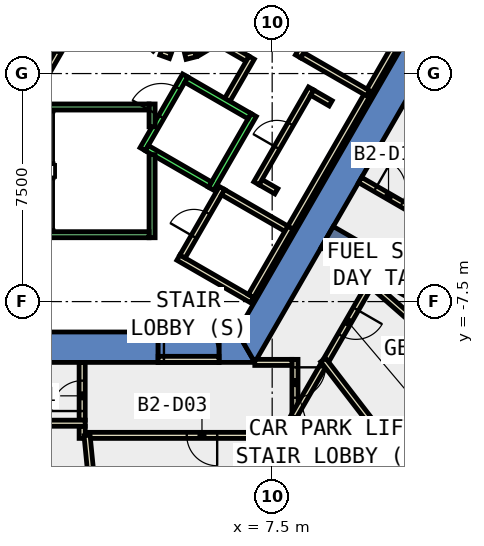
"""IFC4 building model, lengths in metres.
Left out: names, types, materials, properties, quantities, classifications, styles, units other than length and angle.
Written with IfcOpenShell. Run it as: python <this file> out.ifc"""

import sys

from ifc_helpers import new_model, si_unit, direction, frame, frame_2d, origin, place, context, subcontext, project, spatial, polyline, rectangle, outline, extrude, element, fill, save


model = new_model("IFC4")
c1 = context("Model", 3, precision=1e-05, world=origin(), true_north=direction((0.0, 1.0)))
c2 = subcontext(c1, "Body", "Model", "MODEL_VIEW")
j1 = project(units=[si_unit("LENGTHUNIT", "METRE"), si_unit("PLANEANGLEUNIT", "RADIAN")], contexts=[c1])
p1 = place(None, origin())
s1 = spatial("IfcSite", under=j1, at=p1, CompositionType="ELEMENT")
p2 = place(p1, origin())
s2 = spatial("IfcBuilding", under=s1, at=p2, CompositionType="ELEMENT")
p3 = place(p2, frame((0.0, 0.0, -11.0)))
s3 = spatial("IfcBuildingStorey", under=s2, at=p3, CompositionType="ELEMENT", Elevation=-11.0)
p4 = place(p3, frame((0.0, 0.0, -0.42)))
e1 = element("IfcWall", 1, at=p4, inside=s3, PredefinedType="SHEAR", context=c2, shape_type="SweptSolid", body=[
    extrude(outline(polyline([(3.75, -9.5), (3.75, -8.5), (-6.351, -8.5), (-6.928, -9.5), (3.75, -9.5)])), origin(), (0.0, 0.0, 1.0), 5.5),
])
p5 = place(p3, frame((0.0, 0.0, -0.42)))
e2 = element("IfcWall", 2, at=p5, inside=s3, PredefinedType="SHEAR", context=c2, shape_type="SweptSolid", body=[
    extrude(outline(polyline([(5.75, -8.5), (5.75, -9.5), (6.928, -9.5), (6.351, -8.5), (5.75, -8.5)])), origin(), (0.0, 0.0, 1.0), 5.5),
])
p6 = place(p3, frame((0.0, 0.0, 3.6)))
e3 = element("IfcWall", 3, at=p6, inside=s3, PredefinedType="SHEAR", context=c2, shape_type="SweptSolid", body=[
    extrude(outline(polyline([(5.75, -9.5), (5.75, -8.5), (3.75, -8.5), (3.75, -9.5), (5.75, -9.5)])), origin(), (0.0, 0.0, 1.0), 1.48),
])
p7 = place(p3, frame((0.0, 0.0, -0.42)))
e4 = element("IfcWall", 4, at=p7, inside=s3, PredefinedType="SHEAR", context=c2, shape_type="SweptSolid", body=[
    extrude(outline(polyline([(6.928, -9.5), (13.856, 2.5), (12.702, 2.5), (6.351, -8.5), (6.928, -9.5)])), origin(), (0.0, 0.0, 1.0), 5.5),
])
p8 = place(p3, frame((9.31, -5.375, -0.42), z_axis=(0.0, 0.0, 1.0), x_axis=(0.866017533419, -0.500013631625, 0.0)))
e5 = element("IfcWall", 5, at=p8, inside=s3, PredefinedType="SHEAR", context=c2, shape_type="SweptSolid", body=[
    extrude(rectangle(XDim=9.0, YDim=0.8, at=frame_2d((4.5, 0.0))), origin(), (0.0, 0.0, 1.0), 5.5),
])
p9 = place(p3, frame((1.25, -11.4, 0.0), z_axis=(0.0, 0.0, 1.0), x_axis=(0.0, 1.0, 0.0)))
e6 = element("IfcWall", 6, at=p9, inside=s3, PredefinedType="PARTITIONING", context=c2, shape_type="SweptSolid", body=[
    extrude(rectangle(XDim=1.9, YDim=0.2, at=frame_2d((0.95, 0.0))), origin(), (0.0, 0.0, 1.0), 5.05),
])
p10 = place(p9, frame((0.3, 0.0, 0.0)))
e7 = element("IfcOpeningElement", 7, at=p10, cuts=e6, PredefinedType="OPENING", context=c2, shape_type="SweptSolid", body=[
    extrude(rectangle(XDim=1.0, YDim=2.1, at=frame_2d((0.5, 1.05))), frame((0.0, 0.11, 0.0), z_axis=(0.0, -1.0, 0.0), x_axis=(1.0, 0.0, 0.0)), (0.0, 0.0, 1.0), 0.22),
])
p11 = place(p3, frame((8.25, -9.4, 0.0), z_axis=(0.0, 0.0, 1.0), x_axis=(0.0, -1.0, 0.0)))
e8 = element("IfcWall", 8, at=p11, inside=s3, PredefinedType="PARTITIONING", context=c2, shape_type="SweptSolid", body=[
    extrude(rectangle(XDim=1.71, YDim=0.2, at=frame_2d((0.855, 0.0))), origin(), (0.0, 0.0, 1.0), 5.05),
])
p12 = place(p11, frame((0.262, 0.0, 0.0)))
e9 = element("IfcOpeningElement", 9, at=p12, cuts=e8, PredefinedType="OPENING", context=c2, shape_type="SweptSolid", body=[
    extrude(rectangle(XDim=1.0, YDim=2.1, at=frame_2d((0.5, 1.05))), frame((0.0, 0.11, 0.0), z_axis=(0.0, -1.0, 0.0), x_axis=(1.0, 0.0, 0.0)), (0.0, 0.0, 1.0), 0.22),
])
p13 = place(p3, frame((6.928, -9.5, 0.0), z_axis=(0.0, 0.0, 1.0), x_axis=(1.0, 0.0, 0.0)))
e10 = element("IfcWall", 10, at=p13, inside=s3, PredefinedType="PARTITIONING", context=c2, shape_type="SweptSolid", body=[
    extrude(rectangle(XDim=1.222, YDim=0.2, at=frame_2d((0.611, 0.0))), origin(), (0.0, 0.0, 1.0), 5.05),
])
p14 = place(p3, frame((8.25, -11.31, 0.0), z_axis=(0.0, 0.0, 1.0), x_axis=(0.0, -1.0, 0.0)))
e11 = element("IfcWall", 11, at=p14, inside=s3, PredefinedType="PARTITIONING", context=c2, shape_type="SweptSolid", body=[
    extrude(rectangle(XDim=0.49, YDim=0.2, at=frame_2d((0.245, 0.0))), origin(), (0.0, 0.0, 1.0), 5.05),
])
p15 = place(p3, frame((8.35, -11.9, 0.0), z_axis=(0.0, 0.0, 1.0), x_axis=(-1.0, 0.0, 0.0)))
e12 = element("IfcWall", 12, at=p15, inside=s3, PredefinedType="PARTITIONING", context=c2, shape_type="SweptSolid", body=[
    extrude(rectangle(XDim=7.039, YDim=0.2, at=frame_2d((3.52, 0.0))), origin(), (0.0, 0.0, 1.0), 5.05),
])
p16 = place(p15, frame((2.659, 0.0, 0.0)))
e13 = element("IfcOpeningElement", 13, at=p16, cuts=e12, PredefinedType="OPENING", context=c2, shape_type="SweptSolid", body=[
    extrude(rectangle(XDim=1.0, YDim=2.1, at=frame_2d((0.5, 1.05))), frame((0.0, 0.11, 0.0), z_axis=(0.0, -1.0, 0.0), x_axis=(1.0, 0.0, 0.0)), (0.0, 0.0, 1.0), 0.22),
])
p17 = place(p3, frame((1.25, -12.0, 0.0), z_axis=(0.0, 0.0, 1.0), x_axis=(0.0, 1.0, 0.0)))
e14 = element("IfcWall", 14, at=p17, inside=s3, PredefinedType="PARTITIONING", context=c2, shape_type="SweptSolid", body=[
    extrude(rectangle(XDim=0.4, YDim=0.2, at=frame_2d((0.2, 0.0))), origin(), (0.0, 0.0, 1.0), 5.05),
])
p18 = place(p3, frame((1.35, -11.5, 0.0), z_axis=(0.0, 0.0, 1.0), x_axis=(-1.0, 0.0, 0.0)))
e15 = element("IfcWall", 15, at=p18, inside=s3, PredefinedType="PARTITIONING", context=c2, shape_type="SweptSolid", body=[
    extrude(rectangle(XDim=8.646, YDim=0.2, at=frame_2d((4.323, 0.0))), origin(), (0.0, 0.0, 1.0), 5.05),
])
p19 = place(p18, frame((3.768, 0.0, 0.0)))
e16 = element("IfcOpeningElement", 16, at=p19, cuts=e15, PredefinedType="OPENING", context=c2, shape_type="SweptSolid", body=[
    extrude(rectangle(XDim=1.0, YDim=2.1, at=frame_2d((0.5, 1.05))), frame((0.0, 0.11, 0.0), z_axis=(0.0, -1.0, 0.0), x_axis=(1.0, 0.0, 0.0)), (0.0, 0.0, 1.0), 0.22),
])
p20 = place(p3, frame((9.238, -9.498, 0.0), z_axis=(0.0, 0.0, 1.0), x_axis=(-0.499780113518, -0.866152318089, 0.0)))
e17 = element("IfcWall", 17, at=p20, inside=s3, PredefinedType="PARTITIONING", context=c2, shape_type="SweptSolid", body=[
    extrude(rectangle(XDim=2.077, YDim=0.2, at=frame_2d((1.039, 0.0))), origin(), (0.0, 0.0, 1.0), 5.05),
])
p21 = place(p3, frame((10.738, -6.901, 0.0), z_axis=(0.0, 0.0, 1.0), x_axis=(-0.500131122175, -0.865949687125, 0.0)))
e18 = element("IfcWall", 18, at=p21, inside=s3, PredefinedType="PARTITIONING", context=c2, shape_type="SweptSolid", body=[
    extrude(rectangle(XDim=2.999, YDim=0.2, at=frame_2d((1.5, 0.0))), origin(), (0.0, 0.0, 1.0), 5.05),
])
p22 = place(p21, frame((0.972, 0.0, 0.0)))
e19 = element("IfcOpeningElement", 19, at=p22, cuts=e18, PredefinedType="OPENING", context=c2, shape_type="SweptSolid", body=[
    extrude(rectangle(XDim=1.0, YDim=2.1, at=frame_2d((0.5, 1.05))), frame((0.0, 0.11, 0.0), z_axis=(0.0, -1.0, 0.0), x_axis=(1.0, 0.0, 0.0)), (0.0, 0.0, 1.0), 0.22),
])
p23 = place(p3, frame((1.587, -13.7, 0.0), z_axis=(0.0, 0.0, 1.0), x_axis=(-0.097324991698, 0.99525265435, 0.0)))
e20 = element("IfcWall", 20, at=p23, inside=s3, PredefinedType="PARTITIONING", context=c2, shape_type="SweptSolid", body=[
    extrude(rectangle(XDim=1.809, YDim=0.2, at=frame_2d((0.904, 0.0))), origin(), (0.0, 0.0, 1.0), 5.05),
])
p24 = place(p3, frame((9.177, -9.419, 0.0), z_axis=(0.0, 0.0, 1.0), x_axis=(0.610158732695, -0.792279193792, 0.0)))
e21 = element("IfcWall", 21, at=p24, inside=s3, PredefinedType="PARTITIONING", context=c2, shape_type="SweptSolid", body=[
    extrude(rectangle(XDim=5.53, YDim=0.2, at=frame_2d((2.765, 0.0))), origin(), (0.0, 0.0, 1.0), 5.05),
])
p25 = place(p3, frame((10.663, -6.835, 0.0), z_axis=(0.0, 0.0, 1.0), x_axis=(0.752269740493, -0.658855247788, 0.0)))
e22 = element("IfcWall", 22, at=p25, inside=s3, PredefinedType="PARTITIONING", context=c2, shape_type="SweptSolid", body=[
    extrude(rectangle(XDim=5.865, YDim=0.2, at=frame_2d((2.932, 0.0))), origin(), (0.0, 0.0, 1.0), 5.05),
])
p26 = place(p3, frame((10.392, -3.5, 0.0), z_axis=(0.0, 0.0, 1.0), x_axis=(0.866010750942, -0.50002537861, 0.0)))
e23 = element("IfcWall", 23, at=p26, inside=s3, PredefinedType="PARTITIONING", context=c2, shape_type="SweptSolid", body=[
    extrude(rectangle(XDim=2.0, YDim=0.2, at=frame_2d((1.0, 0.0))), origin(), (0.0, 0.0, 1.0), 5.05),
])
p27 = place(p26, frame((0.58, 0.0, 0.0)))
e24 = element("IfcOpeningElement", 24, at=p27, cuts=e23, PredefinedType="OPENING", context=c2, shape_type="SweptSolid", body=[
    extrude(rectangle(XDim=1.0, YDim=2.1, at=frame_2d((0.5, 1.05))), frame((0.0, 0.11, 0.0), z_axis=(0.0, -1.0, 0.0), x_axis=(1.0, 0.0, 0.0)), (0.0, 0.0, 1.0), 0.22),
])
p28 = place(p3, frame((6.84, -7.453, 0.0), z_axis=(0.0, 0.0, 1.0), x_axis=(-0.866056369097, 0.49994636267, 0.0)))
e25 = element("IfcWall", 25, at=p28, inside=s3, PredefinedType="PARTITIONING", context=c2, shape_type="SweptSolid", body=[
    extrude(rectangle(XDim=2.8, YDim=0.2, at=frame_2d((1.4, 0.0))), origin(), (0.0, 0.0, 1.0), 5.05),
])
p29 = place(p3, frame((4.551, -6.017, 0.0), z_axis=(0.0, 0.0, 1.0), x_axis=(0.499925626596, 0.866068339032, 0.0)))
e26 = element("IfcWall", 26, at=p29, inside=s3, PredefinedType="PARTITIONING", context=c2, shape_type="SweptSolid", body=[
    extrude(rectangle(XDim=2.601, YDim=0.2, at=frame_2d((1.3, 0.0))), origin(), (0.0, 0.0, 1.0), 5.05),
])
p30 = place(p29, frame((0.75, 0.0, 0.0)))
e27 = element("IfcOpeningElement", 27, at=p30, cuts=e26, PredefinedType="OPENING", context=c2, shape_type="SweptSolid", body=[
    extrude(rectangle(XDim=0.9, YDim=2.1, at=frame_2d((0.45, 1.05))), frame((0.0, 0.11, 0.0), z_axis=(0.0, -1.0, 0.0), x_axis=(1.0, 0.0, 0.0)), (0.0, 0.0, 1.0), 0.22),
])
p31 = place(p3, frame((5.888, -3.902, 0.0), z_axis=(0.0, 0.0, 1.0), x_axis=(0.866022959057, -0.500004234368, 0.0)))
e28 = element("IfcWall", 28, at=p31, inside=s3, PredefinedType="PARTITIONING", context=c2, shape_type="SweptSolid", body=[
    extrude(rectangle(XDim=2.5, YDim=0.2, at=frame_2d((1.25, 0.0))), origin(), (0.0, 0.0, 1.0), 5.05),
])
p32 = place(p3, frame((8.103, -5.065, 0.0), z_axis=(0.0, 0.0, 1.0), x_axis=(-0.49996627774, -0.866044872465, 0.0)))
e29 = element("IfcWall", 29, at=p32, inside=s3, PredefinedType="PARTITIONING", context=c2, shape_type="SweptSolid", body=[
    extrude(rectangle(XDim=2.6, YDim=0.2, at=frame_2d((1.3, 0.0))), origin(), (0.0, 0.0, 1.0), 5.05),
])
p33 = place(p3, frame((7.637, -3.872, 0.0), z_axis=(0.0, 0.0, 1.0), x_axis=(-0.866158505053, 0.499769390944, 0.0)))
e30 = element("IfcWall", 30, at=p33, inside=s3, PredefinedType="PARTITIONING", context=c2, shape_type="SweptSolid", body=[
    extrude(rectangle(XDim=0.6, YDim=0.2, at=frame_2d((0.3, 0.0))), origin(), (0.0, 0.0, 1.0), 5.05),
])
p34 = place(p3, frame((6.981, -3.609, 0.0), z_axis=(0.0, 0.0, 1.0), x_axis=(0.499982693035, 0.866035395735, 0.0)))
e31 = element("IfcWall", 31, at=p34, inside=s3, PredefinedType="PARTITIONING", context=c2, shape_type="SweptSolid", body=[
    extrude(rectangle(XDim=3.6, YDim=0.2, at=frame_2d((1.8, 0.0))), origin(), (0.0, 0.0, 1.0), 5.05),
])
p35 = place(p34, frame((1.35, 0.0, 0.0)))
e32 = element("IfcOpeningElement", 32, at=p35, cuts=e31, PredefinedType="OPENING", context=c2, shape_type="SweptSolid", body=[
    extrude(rectangle(XDim=0.9, YDim=2.1, at=frame_2d((0.45, 1.05))), frame((0.0, 0.11, 0.0), z_axis=(0.0, -1.0, 0.0), x_axis=(1.0, 0.0, 0.0)), (0.0, 0.0, 1.0), 0.22),
])
p36 = place(p3, frame((8.817, -0.628, 0.0), z_axis=(0.0, 0.0, 1.0), x_axis=(0.866307342011, -0.4995113504, 0.0)))
e33 = element("IfcWall", 33, at=p36, inside=s3, PredefinedType="PARTITIONING", context=c2, shape_type="SweptSolid", body=[
    extrude(rectangle(XDim=0.701, YDim=0.2, at=frame_2d((0.351, 0.0))), origin(), (0.0, 0.0, 1.0), 5.05),
])
p37 = place(p3, frame((10.703, -0.562, 0.0), z_axis=(0.0, 0.0, 1.0), x_axis=(-0.500012382935, -0.866018254376, 0.0)))
e34 = element("IfcWall", 34, at=p37, inside=s3, PredefinedType="PARTITIONING", context=c2, shape_type="SweptSolid", body=[
    extrude(rectangle(XDim=5.199, YDim=0.2, at=frame_2d((2.6, 0.0))), origin(), (0.0, 0.0, 1.0), 5.05),
])
p38 = place(p3, frame((10.653, -0.648, 0.0), z_axis=(0.0, 0.0, 1.0), x_axis=(-0.866022959057, 0.500004234368, 0.0)))
e35 = element("IfcWall", 35, at=p38, inside=s3, PredefinedType="PARTITIONING", context=c2, shape_type="SweptSolid", body=[
    extrude(rectangle(XDim=2.5, YDim=0.2, at=frame_2d((1.25, 0.0))), origin(), (0.0, 0.0, 1.0), 5.05),
])
p39 = place(p3, frame((11.903, 1.517, 0.0), z_axis=(0.0, 0.0, 1.0), x_axis=(-0.499945471869, -0.866056883327, 0.0)))
e36 = element("IfcWall", 36, at=p39, inside=s3, PredefinedType="PARTITIONING", context=c2, shape_type="SweptSolid", body=[
    extrude(rectangle(XDim=2.401, YDim=0.2, at=frame_2d((1.2, 0.0))), origin(), (0.0, 0.0, 1.0), 5.05),
])
p40 = place(p3, frame((8.351, 0.565, 0.0), z_axis=(0.0, 0.0, 1.0), x_axis=(0.49989585183, 0.866085525409, 0.0)))
e37 = element("IfcWall", 37, at=p40, inside=s3, PredefinedType="PARTITIONING", context=c2, shape_type="SweptSolid", body=[
    extrude(rectangle(XDim=2.6, YDim=0.2, at=frame_2d((1.3, 0.0))), origin(), (0.0, 0.0, 1.0), 5.05),
])
p41 = place(p40, frame((0.95, 0.0, 0.0)))
e38 = element("IfcOpeningElement", 38, at=p41, cuts=e37, PredefinedType="OPENING", context=c2, shape_type="SweptSolid", body=[
    extrude(rectangle(XDim=0.9, YDim=2.1, at=frame_2d((0.45, 1.05))), frame((0.0, 0.11, 0.0), z_axis=(0.0, -1.0, 0.0), x_axis=(1.0, 0.0, 0.0)), (0.0, 0.0, 1.0), 0.22),
])
p42 = place(p3, frame((3.838, 0.702, 0.0), z_axis=(0.0, 0.0, 1.0), x_axis=(0.941035081519, -0.338308993895, 0.0)))
e39 = element("IfcWall", 39, at=p42, inside=s3, PredefinedType="PARTITIONING", context=c2, shape_type="SweptSolid", body=[
    extrude(rectangle(XDim=0.337, YDim=0.2, at=frame_2d((0.168, 0.0))), origin(), (0.0, 0.0, 1.0), 5.05),
])
p43 = place(p3, frame((4.644, 0.564, 0.0), z_axis=(0.0, 0.0, 1.0), x_axis=(0.969929076366, 0.243387729394, 0.0)))
e40 = element("IfcWall", 40, at=p43, inside=s3, PredefinedType="PARTITIONING", context=c2, shape_type="SweptSolid", body=[
    extrude(rectangle(XDim=0.337, YDim=0.2, at=frame_2d((0.168, 0.0))), origin(), (0.0, 0.0, 1.0), 5.05),
])
p44 = place(p3, frame((5.042, 0.676, 0.0), z_axis=(0.0, 0.0, 1.0), x_axis=(0.857940155512, 0.513749637042, 0.0)))
e41 = element("IfcWall", 41, at=p44, inside=s3, PredefinedType="PARTITIONING", context=c2, shape_type="SweptSolid", body=[
    extrude(rectangle(XDim=0.337, YDim=0.2, at=frame_2d((0.168, 0.0))), origin(), (0.0, 0.0, 1.0), 5.05),
])
p45 = place(p3, frame((5.499, 1.172, 0.0), z_axis=(0.0, 0.0, 1.0), x_axis=(0.866333505267, -0.499465972466, 0.0)))
e42 = element("IfcWall", 42, at=p45, inside=s3, PredefinedType="PARTITIONING", context=c2, shape_type="SweptSolid", body=[
    extrude(rectangle(XDim=1.374, YDim=0.2, at=frame_2d((0.687, 0.0))), origin(), (0.0, 0.0, 1.0), 5.05),
])
p46 = place(p3, frame((6.826, 0.522, 0.0), z_axis=(0.0, 0.0, 1.0), x_axis=(-0.500016722714, -0.866015748706, 0.0)))
e43 = element("IfcWall", 43, at=p46, inside=s3, PredefinedType="PARTITIONING", context=c2, shape_type="SweptSolid", body=[
    extrude(rectangle(XDim=1.7, YDim=0.2, at=frame_2d((0.85, 0.0))), origin(), (0.0, 0.0, 1.0), 5.05),
])
p47 = place(p3, frame((-0.52, -1.0, 0.0), z_axis=(0.0, 0.0, 1.0), x_axis=(0.50011622646, 0.865958290007, 0.0)))
e44 = element("IfcWall", 44, at=p47, inside=s3, PredefinedType="PARTITIONING", context=c2, shape_type="SweptSolid", body=[
    extrude(rectangle(XDim=4.991, YDim=0.2, at=frame_2d((2.496, 0.0))), origin(), (0.0, 0.0, 1.0), 5.05),
])
p48 = place(p47, frame((1.945, 0.0, 0.0)))
e45 = element("IfcOpeningElement", 45, at=p48, cuts=e44, PredefinedType="OPENING", context=c2, shape_type="SweptSolid", body=[
    extrude(rectangle(XDim=1.0, YDim=2.1, at=frame_2d((0.5, 1.05))), frame((0.0, 0.11, 0.0), z_axis=(0.0, -1.0, 0.0), x_axis=(1.0, 0.0, 0.0)), (0.0, 0.0, 1.0), 0.22),
])
p49 = place(p3, frame((3.75, -9.4, 0.0), z_axis=(0.0, 0.0, 1.0), x_axis=(1.0, 0.0, 0.0)))
e46 = element("IfcWall", 46, at=p49, inside=s3, PredefinedType="PARTITIONING", context=c2, shape_type="SweptSolid", body=[
    extrude(rectangle(XDim=2.0, YDim=0.2, at=frame_2d((1.0, 0.0))), origin(), (0.0, 0.0, 1.0), 2.4),
])
p50 = place(p49, frame((0.19, 0.0, 0.0)))
e47 = element("IfcOpeningElement", 47, at=p50, cuts=e46, PredefinedType="OPENING", context=c2, shape_type="SweptSolid", body=[
    extrude(rectangle(XDim=1.8, YDim=2.1, at=frame_2d((0.9, 1.05))), frame((0.0, 0.11, 0.0), z_axis=(0.0, -1.0, 0.0), x_axis=(1.0, 0.0, 0.0)), (0.0, 0.0, 1.0), 0.22),
])
p51 = place(p3, frame((3.24, -2.488, 0.0), z_axis=(0.0, 0.0, 1.0), x_axis=(0.49994636267, 0.866056369097, 0.0)))
e48 = element("IfcWall", 48, at=p51, inside=s3, PredefinedType="STANDARD", context=c2, shape_type="SweptSolid", body=[
    extrude(rectangle(XDim=2.8, YDim=0.2, at=frame_2d((1.4, 0.0))), origin(), (0.0, 0.0, 1.0), 5.05),
])
p52 = place(p51, frame((1.225, 0.0, 0.0)))
e49 = element("IfcOpeningElement", 49, at=p52, cuts=e48, PredefinedType="OPENING", context=c2, shape_type="SweptSolid", body=[
    extrude(rectangle(XDim=1.1, YDim=2.1, at=frame_2d((0.55, 1.05))), frame((0.0, 0.11, 0.0), z_axis=(0.0, -1.0, 0.0), x_axis=(1.0, 0.0, 0.0)), (0.0, 0.0, 1.0), 0.22),
])
p53 = place(p3, frame((5.492, -3.788, 0.0), z_axis=(0.0, 0.0, 1.0), x_axis=(0.500011755427, 0.866018616679, 0.0)))
e50 = element("IfcWall", 50, at=p53, inside=s3, PredefinedType="STANDARD", context=c2, shape_type="SweptSolid", body=[
    extrude(rectangle(XDim=2.8, YDim=0.2, at=frame_2d((1.4, 0.0))), origin(), (0.0, 0.0, 1.0), 5.05),
])
p54 = place(p3, frame((3.377, -2.452, 0.0), z_axis=(0.0, 0.0, 1.0), x_axis=(0.865955154139, -0.50012165622, 0.0)))
e51 = element("IfcWall", 51, at=p54, inside=s3, PredefinedType="STANDARD", context=c2, shape_type="SweptSolid", body=[
    extrude(rectangle(XDim=2.4, YDim=0.2, at=frame_2d((1.2, 0.0))), origin(), (0.0, 0.0, 1.0), 5.05),
])
p55 = place(p3, frame((4.677, -0.2, 0.0), z_axis=(0.0, 0.0, 1.0), x_axis=(0.865973769406, -0.500089422704, 0.0)))
e52 = element("IfcWall", 52, at=p55, inside=s3, PredefinedType="STANDARD", context=c2, shape_type="SweptSolid", body=[
    extrude(rectangle(XDim=2.399, YDim=0.2, at=frame_2d((1.2, 0.0))), origin(), (0.0, 0.0, 1.0), 5.05),
])
p56 = place(p3, frame((3.55, -2.667, 0.0), z_axis=(0.0, 0.0, 1.0), x_axis=(0.0, -1.0, 0.0)))
e53 = element("IfcWall", 53, at=p56, inside=s3, PredefinedType="STANDARD", context=c2, shape_type="SweptSolid", body=[
    extrude(rectangle(XDim=2.733, YDim=0.2, at=frame_2d((1.366, 0.0))), origin(), (0.0, 0.0, 1.0), 5.05),
])
p57 = place(p3, frame((3.55, -1.0, 0.0), z_axis=(0.0, 0.0, 1.0), x_axis=(0.0, -1.0, 0.0)))
e54 = element("IfcWall", 54, at=p57, inside=s3, PredefinedType="STANDARD", context=c2, shape_type="SweptSolid", body=[
    extrude(rectangle(XDim=0.751, YDim=0.2, at=frame_2d((0.375, 0.0))), origin(), (0.0, 0.0, 1.0), 5.05),
])
p58 = place(p3, frame((-3.45, -1.1, 0.0), z_axis=(0.0, 0.0, 1.0), x_axis=(1.0, 0.0, 0.0)))
e55 = element("IfcWall", 55, at=p58, inside=s3, PredefinedType="STANDARD", context=c2, shape_type="SweptSolid", body=[
    extrude(rectangle(XDim=6.9, YDim=0.2, at=frame_2d((3.45, 0.0))), origin(), (0.0, 0.0, 1.0), 5.05),
])
p59 = place(p58, frame((0.45, 0.0, 0.0)))
e56 = element("IfcOpeningElement", 56, at=p59, cuts=e55, PredefinedType="OPENING", context=c2, shape_type="SweptSolid", body=[
    extrude(rectangle(XDim=1.1, YDim=2.2, at=frame_2d((0.55, 1.1))), frame((0.0, 0.11, 0.0), z_axis=(0.0, -1.0, 0.0), x_axis=(1.0, 0.0, 0.0)), (0.0, 0.0, 1.0), 0.22),
])
p60 = place(p3, frame((-3.45, -5.3, 0.0), z_axis=(0.0, 0.0, 1.0), x_axis=(1.0, 0.0, 0.0)))
e57 = element("IfcWall", 57, at=p60, inside=s3, PredefinedType="STANDARD", context=c2, shape_type="SweptSolid", body=[
    extrude(rectangle(XDim=6.9, YDim=0.2, at=frame_2d((3.45, 0.0))), origin(), (0.0, 0.0, 1.0), 5.05),
])
p61 = place(p10, origin())
e58 = element("IfcDoor", 58, at=p61, inside=s3, OperationType="SINGLE_SWING_LEFT", PredefinedType="DOOR", context=c2, shape_type="SweptSolid", body=[
    extrude(rectangle(XDim=1.0, YDim=2.1, at=frame_2d((0.5, 1.05))), frame((0.0, 0.025, 0.0), z_axis=(0.0, -1.0, 0.0), x_axis=(1.0, 0.0, 0.0)), (0.0, 0.0, 1.0), 0.05),
])
fill(e7, e58)
p62 = place(p12, origin())
e59 = element("IfcDoor", 59, at=p62, inside=s3, OperationType="SINGLE_SWING_RIGHT", PredefinedType="DOOR", context=c2, shape_type="SweptSolid", body=[
    extrude(rectangle(XDim=1.0, YDim=2.1, at=frame_2d((0.5, 1.05))), frame((0.0, 0.025, 0.0), z_axis=(0.0, -1.0, 0.0), x_axis=(1.0, 0.0, 0.0)), (0.0, 0.0, 1.0), 0.05),
])
fill(e9, e59)
p63 = place(p16, origin())
e60 = element("IfcDoor", 60, at=p63, inside=s3, OperationType="SINGLE_SWING_LEFT", PredefinedType="DOOR", context=c2, shape_type="SweptSolid", body=[
    extrude(rectangle(XDim=1.0, YDim=2.1, at=frame_2d((0.5, 1.05))), frame((0.0, 0.025, 0.0), z_axis=(0.0, -1.0, 0.0), x_axis=(1.0, 0.0, 0.0)), (0.0, 0.0, 1.0), 0.05),
])
fill(e13, e60)
p64 = place(p22, origin())
e61 = element("IfcDoor", 61, at=p64, inside=s3, OperationType="SINGLE_SWING_RIGHT", PredefinedType="DOOR", context=c2, shape_type="SweptSolid", body=[
    extrude(rectangle(XDim=1.0, YDim=2.1, at=frame_2d((0.5, 1.05))), frame((0.0, 0.025, 0.0), z_axis=(0.0, -1.0, 0.0), x_axis=(1.0, 0.0, 0.0)), (0.0, 0.0, 1.0), 0.05),
])
fill(e19, e61)
p65 = place(p27, origin())
e62 = element("IfcDoor", 62, at=p65, inside=s3, OperationType="SINGLE_SWING_LEFT", PredefinedType="DOOR", context=c2, shape_type="SweptSolid", body=[
    extrude(rectangle(XDim=1.0, YDim=2.1, at=frame_2d((0.5, 1.05))), frame((0.0, 0.025, 0.0), z_axis=(0.0, -1.0, 0.0), x_axis=(1.0, 0.0, 0.0)), (0.0, 0.0, 1.0), 0.05),
])
fill(e24, e62)
p66 = place(p48, origin())
e63 = element("IfcDoor", 63, at=p66, inside=s3, OperationType="SINGLE_SWING_LEFT", PredefinedType="DOOR", context=c2, shape_type="SweptSolid", body=[
    extrude(rectangle(XDim=1.0, YDim=2.1, at=frame_2d((0.5, 1.05))), frame((0.0, 0.025, 0.0), z_axis=(0.0, -1.0, 0.0), x_axis=(1.0, 0.0, 0.0)), (0.0, 0.0, 1.0), 0.05),
])
fill(e45, e63)
p67 = place(p30, origin())
e64 = element("IfcDoor", 64, at=p67, inside=s3, OperationType="SINGLE_SWING_RIGHT", PredefinedType="DOOR", context=c2, shape_type="SweptSolid", body=[
    extrude(rectangle(XDim=0.9, YDim=2.1, at=frame_2d((0.45, 1.05))), frame((0.0, 0.025, 0.0), z_axis=(0.0, -1.0, 0.0), x_axis=(1.0, 0.0, 0.0)), (0.0, 0.0, 1.0), 0.05),
])
fill(e27, e64)
p68 = place(p35, origin())
e65 = element("IfcDoor", 65, at=p68, inside=s3, OperationType="SINGLE_SWING_RIGHT", PredefinedType="DOOR", context=c2, shape_type="SweptSolid", body=[
    extrude(rectangle(XDim=0.9, YDim=2.1, at=frame_2d((0.45, 1.05))), frame((0.0, 0.025, 0.0), z_axis=(0.0, -1.0, 0.0), x_axis=(1.0, 0.0, 0.0)), (0.0, 0.0, 1.0), 0.05),
])
fill(e32, e65)
p69 = place(p50, origin())
e66 = element("IfcDoor", 66, at=p69, inside=s3, OperationType="DOUBLE_DOOR_SINGLE_SWING", PredefinedType="DOOR", context=c2, shape_type="SweptSolid", body=[
    extrude(rectangle(XDim=1.8, YDim=2.1, at=frame_2d((0.9, 1.05))), frame((0.0, 0.025, 0.0), z_axis=(0.0, -1.0, 0.0), x_axis=(1.0, 0.0, 0.0)), (0.0, 0.0, 1.0), 0.05),
])
fill(e47, e66)
p70 = place(p52, origin())
e67 = element("IfcDoor", 67, at=p70, inside=s3, OperationType="SLIDING_TO_LEFT", PredefinedType="DOOR", context=c2, shape_type="SweptSolid", body=[
    extrude(rectangle(XDim=1.1, YDim=2.1, at=frame_2d((0.55, 1.05))), frame((0.0, 0.025, 0.0), z_axis=(0.0, -1.0, 0.0), x_axis=(1.0, 0.0, 0.0)), (0.0, 0.0, 1.0), 0.05),
])
fill(e49, e67)
save(model, sys.argv[1])
